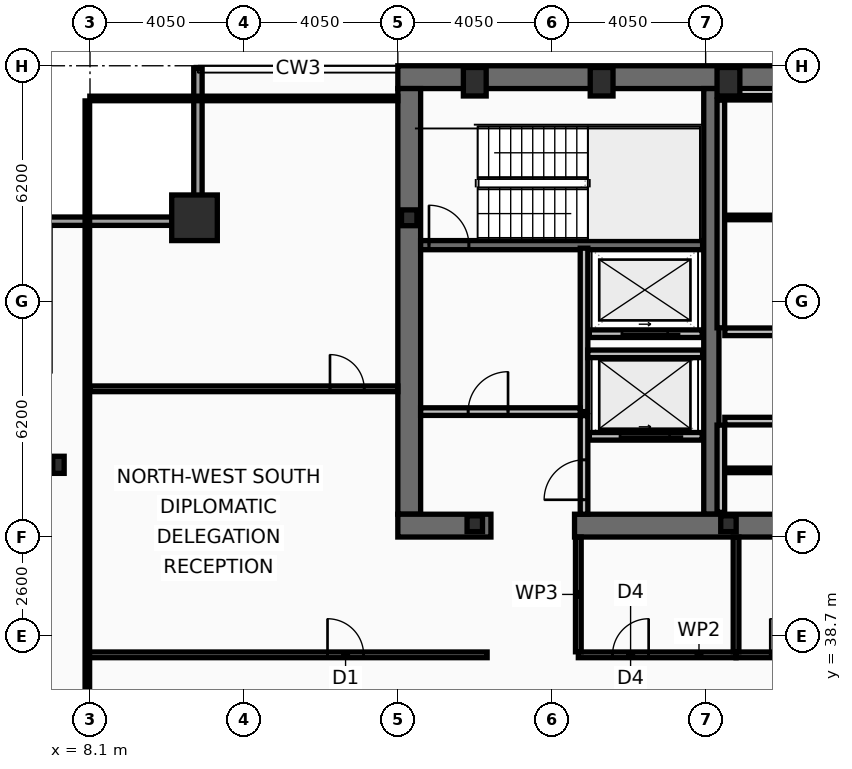
"""IFC4 building model, lengths in metres.
Left out: names, types, materials, properties, quantities, classifications, styles, units other than length and angle.
Written with IfcOpenShell. Run it as: python <this file> out.ifc"""

import sys

from ifc_helpers import new_model, si_unit, direction, frame, frame_2d, origin, origin_2d, place, context, subcontext, project, spatial, rectangle, hollow_rectangle, i_section, extrude, element, fill, save


model = new_model("IFC4")
c1 = context("Model", 3, precision=1e-05, world=origin(), true_north=direction((0.0, 1.0)))
c2 = subcontext(c1, "Body", "Model", "MODEL_VIEW")
j1 = project(units=[si_unit("LENGTHUNIT", "METRE"), si_unit("PLANEANGLEUNIT", "RADIAN")], contexts=[c1])
p1 = place(None, origin())
s1 = spatial("IfcSite", under=j1, at=p1, CompositionType="ELEMENT")
p2 = place(p1, origin())
s2 = spatial("IfcBuilding", under=s1, at=p2, CompositionType="ELEMENT")
p3 = place(p2, frame((0.0, 0.0, 210.2)))
s3 = spatial("IfcBuildingStorey", under=s2, at=p3, CompositionType="ELEMENT", Elevation=210.2)
p4 = place(p3, frame((16.2, 53.4, 0.0), z_axis=(0.0, 0.0, 1.0), x_axis=(1.0, 0.0, 0.0)))
e1 = element("IfcWall", 1, at=p4, inside=s3, PredefinedType="SHEAR", context=c2, shape_type="SweptSolid", body=[
    extrude(rectangle(XDim=40.5, YDim=0.6, at=frame_2d((20.25, 0.0))), origin(), (0.0, 0.0, 1.0), 3.44),
])
p5 = place(p3, frame((16.5, 41.9, 0.0), z_axis=(0.0, 0.0, 1.0), x_axis=(0.0, 1.0, 0.0)))
e2 = element("IfcWall", 2, at=p5, inside=s3, PredefinedType="SHEAR", context=c2, shape_type="SweptSolid", body=[
    extrude(rectangle(XDim=11.2, YDim=0.6, at=frame_2d((5.6, 0.0))), origin(), (0.0, 0.0, 1.0), 3.44),
])
p6 = place(p3, frame((24.45, 41.9, 0.0), z_axis=(0.0, 0.0, 1.0), x_axis=(0.0, 1.0, 0.0)))
e3 = element("IfcWall", 3, at=p6, inside=s3, PredefinedType="SHEAR", context=c2, shape_type="SweptSolid", body=[
    extrude(rectangle(XDim=11.2, YDim=0.4, at=frame_2d((5.6, 0.0))), origin(), (0.0, 0.0, 1.0), 3.44),
])
p7 = place(p3, frame((18.65, 41.6, 0.0), z_axis=(0.0, 0.0, 1.0), x_axis=(-1.0, 0.0, 0.0)))
e4 = element("IfcWall", 4, at=p7, inside=s3, PredefinedType="SHEAR", context=c2, shape_type="SweptSolid", body=[
    extrude(rectangle(XDim=2.45, YDim=0.6, at=frame_2d((1.225, 0.0))), origin(), (0.0, 0.0, 1.0), 3.44),
])
p8 = place(p3, frame((32.3, 41.6, 0.0), z_axis=(0.0, 0.0, 1.0), x_axis=(-1.0, 0.0, 0.0)))
e5 = element("IfcWall", 5, at=p8, inside=s3, PredefinedType="SHEAR", context=c2, shape_type="SweptSolid", body=[
    extrude(rectangle(XDim=11.45, YDim=0.6, at=frame_2d((5.725, 0.0))), origin(), (0.0, 0.0, 1.0), 3.44),
])
p9 = place(p3, frame((16.8, 48.98, 0.0), z_axis=(0.0, 0.0, 1.0), x_axis=(1.0, 0.0, 0.0)))
e6 = element("IfcWall", 6, at=p9, inside=s3, PredefinedType="SHEAR", context=c2, shape_type="SweptSolid", body=[
    extrude(rectangle(XDim=7.42, YDim=0.24, at=frame_2d((3.71, 0.0))), origin(), (0.0, 0.0, 1.0), 3.44),
])
p10 = place(p9, frame((0.22, 0.0, 0.0)))
e7 = element("IfcOpeningElement", 7, at=p10, cuts=e6, PredefinedType="OPENING", context=c2, shape_type="SweptSolid", body=[
    extrude(rectangle(XDim=1.05, YDim=2.15, at=frame_2d((0.525, 1.075))), frame((0.0, 0.13, 0.0), z_axis=(0.0, -1.0, 0.0), x_axis=(1.0, 0.0, 0.0)), (0.0, 0.0, 1.0), 0.26),
])
p11 = place(p3, frame((10.85, 49.7, 0.0), z_axis=(0.0, 0.0, 1.0), x_axis=(1.0, 0.0, 0.0)))
e8 = element("IfcColumn", 8, at=p11, inside=s3, PredefinedType="COLUMN", context=c2, shape_type="SweptSolid", body=[
    extrude(hollow_rectangle(XDim=1.2, YDim=1.2, WallThickness=0.06, at=origin_2d()), origin(), (0.0, 0.0, 1.0), 3.6),
])
for number, where, z_axis, x_axis in (
    (9, (18.225, 53.28, 0.0), (0.0, 0.0, 1.0), (1.0, 0.0, 0.0)),
    (10, (21.562, 53.28, 0.0), (0.0, 0.0, 1.0), (1.0, 0.0, 0.0)),
    (11, (24.9, 53.28, 0.0), (0.0, 0.0, 1.0), (1.0, 0.0, 0.0)),
):
    element("IfcColumn", number, at=place(p3, frame(where, z_axis=z_axis, x_axis=x_axis)), inside=s3, PredefinedType="COLUMN", context=c2, shape_type="SweptSolid", body=[
        extrude(hollow_rectangle(XDim=0.6, YDim=0.75, WallThickness=0.045, at=origin_2d()), origin(), (0.0, 0.0, 1.0), 3.6),
    ])
p12 = place(p3, frame((7.27, 43.2, 0.0), z_axis=(0.0, 0.0, 1.0), x_axis=(1.0, 0.0, 0.0)))
e12 = element("IfcColumn", 12, at=p12, inside=s3, PredefinedType="COLUMN", context=c2, shape_type="SweptSolid", body=[
    extrude(i_section(OverallWidth=0.3, OverallDepth=0.45, WebThickness=0.014, FlangeThickness=0.026, at=origin_2d()), origin(), (0.0, 0.0, 1.0), 3.6),
])
for number, where, z_axis, x_axis in (
    (13, (16.5, 49.7, 0.0), (0.0, 0.0, 1.0), (1.0, 0.0, 0.0)),
    (14, (18.225, 41.65, 0.0), (0.0, 0.0, 1.0), (1.0, 0.0, 0.0)),
    (15, (24.9, 41.65, 0.0), (0.0, 0.0, 1.0), (1.0, 0.0, 0.0)),
):
    element("IfcColumn", number, at=place(p3, frame(where, z_axis=z_axis, x_axis=x_axis)), inside=s3, PredefinedType="COLUMN", context=c2, shape_type="SweptSolid", body=[
        extrude(i_section(OverallWidth=0.406, OverallDepth=0.416, WebThickness=0.03, FlangeThickness=0.048, at=origin_2d()), origin(), (0.0, 0.0, 1.0), 3.6),
    ])
p13 = place(p3, frame((6.83, 49.61, 0.0), z_axis=(0.0, 0.0, 1.0), x_axis=(1.0, 0.0, 0.0)))
e16 = element("IfcWall", 16, at=p13, inside=s3, PredefinedType="SOLIDWALL", context=c2, shape_type="SweptSolid", body=[
    extrude(rectangle(XDim=4.22, YDim=0.22, at=frame_2d((2.11, 0.0))), origin(), (0.0, 0.0, 1.0), 2.83),
])
p14 = place(p3, frame((10.94, 49.72, 0.0), z_axis=(0.0, 0.0, 1.0), x_axis=(0.0, 1.0, 0.0)))
e17 = element("IfcWall", 17, at=p14, inside=s3, PredefinedType="SOLIDWALL", context=c2, shape_type="SweptSolid", body=[
    extrude(rectangle(XDim=3.91, YDim=0.22, at=frame_2d((1.955, 0.0))), origin(), (0.0, 0.0, 1.0), 2.83),
])
p15 = place(p3, frame((24.21, 43.95, 0.0), z_axis=(0.0, 0.0, 1.0), x_axis=(-1.0, 0.0, 0.0)))
e18 = element("IfcWall", 18, at=p15, inside=s3, PredefinedType="PARTITIONING", context=c2, shape_type="SweptSolid", body=[
    extrude(rectangle(XDim=2.97, YDim=0.2, at=frame_2d((1.485, 0.0))), origin(), (0.0, 0.0, 1.0), 3.44),
])
p16 = place(p15, frame((0.86, 0.0, 0.0)))
e19 = element("IfcOpeningElement", 19, at=p16, cuts=e18, PredefinedType="OPENING", context=c2, shape_type="SweptSolid", body=[
    extrude(rectangle(XDim=1.3, YDim=2.18, at=frame_2d((0.65, 1.09))), frame((0.0, 0.11, 0.0), z_axis=(0.0, -1.0, 0.0), x_axis=(1.0, 0.0, 0.0)), (0.0, 0.0, 1.0), 0.22),
])
p17 = place(p3, frame((24.21, 46.65, 0.0), z_axis=(0.0, 0.0, 1.0), x_axis=(-1.0, 0.0, 0.0)))
e20 = element("IfcWall", 20, at=p17, inside=s3, PredefinedType="PARTITIONING", context=c2, shape_type="SweptSolid", body=[
    extrude(rectangle(XDim=2.97, YDim=0.2, at=frame_2d((1.485, 0.0))), origin(), (0.0, 0.0, 1.0), 3.44),
])
p18 = place(p17, frame((0.91, 0.0, 0.0)))
e21 = element("IfcOpeningElement", 21, at=p18, cuts=e20, PredefinedType="OPENING", context=c2, shape_type="SweptSolid", body=[
    extrude(rectangle(XDim=1.2, YDim=2.18, at=frame_2d((0.6, 1.09))), frame((0.0, 0.11, 0.0), z_axis=(0.0, -1.0, 0.0), x_axis=(1.0, 0.0, 0.0)), (0.0, 0.0, 1.0), 0.22),
])
p19 = place(p3, frame((21.1, 44.6, 0.0), z_axis=(0.0, 0.0, 1.0), x_axis=(0.0, 1.0, 0.0)))
e22 = element("IfcWall", 22, at=p19, inside=s3, PredefinedType="PARTITIONING", context=c2, shape_type="SweptSolid", body=[
    extrude(rectangle(XDim=4.3, YDim=0.2, at=frame_2d((2.15, 0.0))), origin(), (0.0, 0.0, 1.0), 3.44),
])
p20 = place(p3, frame((16.8, 44.6, 0.0), z_axis=(0.0, 0.0, 1.0), x_axis=(1.0, 0.0, 0.0)))
e23 = element("IfcWall", 23, at=p20, inside=s3, PredefinedType="PARTITIONING", context=c2, shape_type="SweptSolid", body=[
    extrude(rectangle(XDim=4.2, YDim=0.2, at=frame_2d((2.1, 0.0))), origin(), (0.0, 0.0, 1.0), 3.44),
])
p21 = place(p20, frame((1.25, 0.0, 0.0)))
e24 = element("IfcOpeningElement", 24, at=p21, cuts=e23, PredefinedType="OPENING", context=c2, shape_type="SweptSolid", body=[
    extrude(rectangle(XDim=1.05, YDim=2.15, at=frame_2d((0.525, 1.075))), frame((0.0, 0.11, 0.0), z_axis=(0.0, -1.0, 0.0), x_axis=(1.0, 0.0, 0.0)), (0.0, 0.0, 1.0), 0.22),
])
p22 = place(p3, frame((21.2, 46.12, 0.0), z_axis=(0.0, 0.0, 1.0), x_axis=(1.0, 0.0, 0.0)))
e25 = element("IfcWall", 25, at=p22, inside=s3, PredefinedType="PARTITIONING", context=c2, shape_type="SweptSolid", body=[
    extrude(rectangle(XDim=3.02, YDim=0.2, at=frame_2d((1.51, 0.0))), origin(), (0.0, 0.0, 1.0), 3.44),
])
p23 = place(p3, frame((21.1, 41.9, 0.0), z_axis=(0.0, 0.0, 1.0), x_axis=(0.0, 1.0, 0.0)))
e26 = element("IfcWall", 26, at=p23, inside=s3, PredefinedType="PARTITIONING", context=c2, shape_type="SweptSolid", body=[
    extrude(rectangle(XDim=2.595, YDim=0.2, at=frame_2d((1.298, 0.0))), origin(), (0.0, 0.0, 1.0), 3.44),
])
p24 = place(p23, frame((0.38, 0.0, 0.0)))
e27 = element("IfcOpeningElement", 27, at=p24, cuts=e26, PredefinedType="OPENING", context=c2, shape_type="SweptSolid", body=[
    extrude(rectangle(XDim=1.05, YDim=2.15, at=frame_2d((0.525, 1.075))), frame((0.0, 0.11, 0.0), z_axis=(0.0, -1.0, 0.0), x_axis=(1.0, 0.0, 0.0)), (0.0, 0.0, 1.0), 0.22),
])
p25 = place(p3, frame((24.7, 46.805, 0.0), z_axis=(0.0, 0.0, 1.0), x_axis=(0.0, 1.0, 0.0)))
e28 = element("IfcWall", 28, at=p25, inside=s3, PredefinedType="PARTITIONING", context=c2, shape_type="SweptSolid", body=[
    extrude(rectangle(XDim=5.99, YDim=0.2, at=frame_2d((2.995, 0.0))), origin(), (0.0, 0.0, 1.0), 3.44),
])
p26 = place(p3, frame((24.805, 52.86, 0.0), z_axis=(0.0, 0.0, 1.0), x_axis=(1.0, 0.0, 0.0)))
e29 = element("IfcWall", 29, at=p26, inside=s3, PredefinedType="PARTITIONING", context=c2, shape_type="SweptSolid", body=[
    extrude(rectangle(XDim=7.51, YDim=0.12, at=frame_2d((3.755, 0.0))), origin(), (0.0, 0.0, 1.0), 3.44),
])
p27 = place(p3, frame((24.805, 49.709, 0.0), z_axis=(0.0, 0.0, 1.0), x_axis=(1.0, 0.0, 0.0)))
e30 = element("IfcWall", 30, at=p27, inside=s3, PredefinedType="PARTITIONING", context=c2, shape_type="SweptSolid", body=[
    extrude(rectangle(XDim=7.51, YDim=0.12, at=frame_2d((3.755, 0.0))), origin(), (0.0, 0.0, 1.0), 3.44),
])
p28 = place(p27, frame((2.4, 0.0, 0.0)))
e31 = element("IfcOpeningElement", 31, at=p28, cuts=e30, PredefinedType="OPENING", context=c2, shape_type="SweptSolid", body=[
    extrude(rectangle(XDim=0.9, YDim=2.05, at=frame_2d((0.45, 1.025))), frame((0.0, 0.07, 0.0), z_axis=(0.0, -1.0, 0.0), x_axis=(1.0, 0.0, 0.0)), (0.0, 0.0, 1.0), 0.14),
])
p29 = place(p3, frame((24.805, 46.7, 0.0), z_axis=(0.0, 0.0, 1.0), x_axis=(1.0, 0.0, 0.0)))
e32 = element("IfcWall", 32, at=p29, inside=s3, PredefinedType="PARTITIONING", context=c2, shape_type="SweptSolid", body=[
    extrude(rectangle(XDim=7.51, YDim=0.2, at=frame_2d((3.755, 0.0))), origin(), (0.0, 0.0, 1.0), 3.44),
])
p30 = place(p29, frame((2.4, 0.0, 0.0)))
e33 = element("IfcOpeningElement", 33, at=p30, cuts=e32, PredefinedType="OPENING", context=c2, shape_type="SweptSolid", body=[
    extrude(rectangle(XDim=0.95, YDim=2.1, at=frame_2d((0.475, 1.05))), frame((0.0, 0.11, 0.0), z_axis=(0.0, -1.0, 0.0), x_axis=(1.0, 0.0, 0.0)), (0.0, 0.0, 1.0), 0.22),
])
p31 = place(p3, frame((24.7, 41.95, 0.0), z_axis=(0.0, 0.0, 1.0), x_axis=(0.0, 1.0, 0.0)))
e34 = element("IfcWall", 34, at=p31, inside=s3, PredefinedType="PARTITIONING", context=c2, shape_type="SweptSolid", body=[
    extrude(rectangle(XDim=2.295, YDim=0.2, at=frame_2d((1.147, 0.0))), origin(), (0.0, 0.0, 1.0), 3.44),
])
p32 = place(p3, frame((24.805, 43.054, 0.0), z_axis=(0.0, 0.0, 1.0), x_axis=(1.0, 0.0, 0.0)))
e35 = element("IfcWall", 35, at=p32, inside=s3, PredefinedType="PARTITIONING", context=c2, shape_type="SweptSolid", body=[
    extrude(rectangle(XDim=7.34, YDim=0.12, at=frame_2d((3.67, 0.0))), origin(), (0.0, 0.0, 1.0), 3.44),
])
p33 = place(p32, frame((2.4, 0.0, 0.0)))
e36 = element("IfcOpeningElement", 36, at=p33, cuts=e35, PredefinedType="OPENING", context=c2, shape_type="SweptSolid", body=[
    extrude(rectangle(XDim=0.9, YDim=2.05, at=frame_2d((0.45, 1.025))), frame((0.0, 0.07, 0.0), z_axis=(0.0, -1.0, 0.0), x_axis=(1.0, 0.0, 0.0)), (0.0, 0.0, 1.0), 0.14),
])
p34 = place(p3, frame((24.805, 44.35, 0.0), z_axis=(0.0, 0.0, 1.0), x_axis=(1.0, 0.0, 0.0)))
e37 = element("IfcWall", 37, at=p34, inside=s3, PredefinedType="PARTITIONING", context=c2, shape_type="SweptSolid", body=[
    extrude(rectangle(XDim=7.34, YDim=0.2, at=frame_2d((3.67, 0.0))), origin(), (0.0, 0.0, 1.0), 3.44),
])
p35 = place(p34, frame((2.4, 0.0, 0.0)))
e38 = element("IfcOpeningElement", 38, at=p35, cuts=e37, PredefinedType="OPENING", context=c2, shape_type="SweptSolid", body=[
    extrude(rectangle(XDim=0.95, YDim=2.1, at=frame_2d((0.475, 1.05))), frame((0.0, 0.11, 0.0), z_axis=(0.0, -1.0, 0.0), x_axis=(1.0, 0.0, 0.0)), (0.0, 0.0, 1.0), 0.22),
])
p36 = place(p3, frame((20.95, 38.2, 0.0), z_axis=(0.0, 0.0, 1.0), x_axis=(1.0, 0.0, 0.0)))
e39 = element("IfcWall", 39, at=p36, inside=s3, PredefinedType="PARTITIONING", context=c2, shape_type="SweptSolid", body=[
    extrude(rectangle(XDim=4.15, YDim=0.15, at=frame_2d((2.075, 0.0))), origin(), (0.0, 0.0, 1.0), 2.73),
])
p37 = place(p36, frame((0.9, 0.0, 0.0)))
e40 = element("IfcOpeningElement", 40, at=p37, cuts=e39, PredefinedType="OPENING", context=c2, shape_type="SweptSolid", body=[
    extrude(rectangle(XDim=0.95, YDim=2.05, at=frame_2d((0.475, 1.025))), frame((0.0, 0.085, 0.0), z_axis=(0.0, -1.0, 0.0), x_axis=(1.0, 0.0, 0.0)), (0.0, 0.0, 1.0), 0.17),
])
p38 = place(p3, frame((25.1, 38.2, 0.0), z_axis=(0.0, 0.0, 1.0), x_axis=(1.0, 0.0, 0.0)))
e41 = element("IfcWall", 41, at=p38, inside=s3, PredefinedType="PARTITIONING", context=c2, shape_type="SweptSolid", body=[
    extrude(rectangle(XDim=4.1, YDim=0.15, at=frame_2d((2.05, 0.0))), origin(), (0.0, 0.0, 1.0), 2.73),
])
p39 = place(p38, frame((0.9, 0.0, 0.0)))
e42 = element("IfcOpeningElement", 42, at=p39, cuts=e41, PredefinedType="OPENING", context=c2, shape_type="SweptSolid", body=[
    extrude(rectangle(XDim=0.95, YDim=2.05, at=frame_2d((0.475, 1.025))), frame((0.0, 0.085, 0.0), z_axis=(0.0, -1.0, 0.0), x_axis=(1.0, 0.0, 0.0)), (0.0, 0.0, 1.0), 0.17),
])
p40 = place(p3, frame((20.95, 38.28, 0.0), z_axis=(0.0, 0.0, 1.0), x_axis=(0.0, 1.0, 0.0)))
e43 = element("IfcWall", 43, at=p40, inside=s3, PredefinedType="PARTITIONING", context=c2, shape_type="SweptSolid", body=[
    extrude(rectangle(XDim=3.02, YDim=0.15, at=frame_2d((1.51, 0.0))), origin(), (0.0, 0.0, 1.0), 3.44),
])
p41 = place(p3, frame((25.1, 38.28, 0.0), z_axis=(0.0, 0.0, 1.0), x_axis=(0.0, 1.0, 0.0)))
e44 = element("IfcWall", 44, at=p41, inside=s3, PredefinedType="PARTITIONING", context=c2, shape_type="SweptSolid", body=[
    extrude(rectangle(XDim=3.02, YDim=0.15, at=frame_2d((1.51, 0.0))), origin(), (0.0, 0.0, 1.0), 2.73),
])
p42 = place(p3, frame((8.03, 38.2, 0.0), z_axis=(0.0, 0.0, 1.0), x_axis=(1.0, 0.0, 0.0)))
e45 = element("IfcWall", 45, at=p42, inside=s3, PredefinedType="PARTITIONING", context=c2, shape_type="SweptSolid", body=[
    extrude(rectangle(XDim=10.52, YDim=0.15, at=frame_2d((5.26, 0.0))), origin(), (0.0, 0.0, 1.0), 2.73),
])
p43 = place(p42, frame((6.32, 0.0, 0.0)))
e46 = element("IfcOpeningElement", 46, at=p43, cuts=e45, PredefinedType="OPENING", context=c2, shape_type="SweptSolid", body=[
    extrude(rectangle(XDim=0.95, YDim=2.05, at=frame_2d((0.475, 1.025))), frame((0.0, 0.085, 0.0), z_axis=(0.0, -1.0, 0.0), x_axis=(1.0, 0.0, 0.0)), (0.0, 0.0, 1.0), 0.17),
])
p44 = place(p3, frame((8.095, 45.2, 0.0), z_axis=(0.0, 0.0, 1.0), x_axis=(1.0, 0.0, 0.0)))
e47 = element("IfcWall", 47, at=p44, inside=s3, PredefinedType="PARTITIONING", context=c2, shape_type="SweptSolid", body=[
    extrude(rectangle(XDim=8.105, YDim=0.15, at=frame_2d((4.052, 0.0))), origin(), (0.0, 0.0, 1.0), 2.83),
])
p45 = place(p44, frame((6.32, 0.0, 0.0)))
e48 = element("IfcOpeningElement", 48, at=p45, cuts=e47, PredefinedType="OPENING", context=c2, shape_type="SweptSolid", body=[
    extrude(rectangle(XDim=0.9, YDim=2.05, at=frame_2d((0.45, 1.025))), frame((0.0, 0.085, 0.0), z_axis=(0.0, -1.0, 0.0), x_axis=(1.0, 0.0, 0.0)), (0.0, 0.0, 1.0), 0.17),
])
p46 = place(p3, frame((8.03, 10.665, 0.0), z_axis=(0.0, 0.0, 1.0), x_axis=(0.0, 1.0, 0.0)))
e49 = element("IfcWall", 49, at=p46, inside=s3, PredefinedType="PARTITIONING", context=c2, shape_type="SweptSolid", body=[
    extrude(rectangle(XDim=42.11, YDim=0.12, at=frame_2d((21.055, 0.0))), origin(), (0.0, 0.0, 1.0), 2.73),
])
p47 = place(p3, frame((8.095, 52.84, 0.0), z_axis=(0.0, 0.0, 1.0), x_axis=(1.0, 0.0, 0.0)))
e50 = element("IfcWall", 50, at=p47, inside=s3, PredefinedType="PARTITIONING", context=c2, shape_type="SweptSolid", body=[
    extrude(rectangle(XDim=8.105, YDim=0.12, at=frame_2d((4.052, 0.0))), origin(), (0.0, 0.0, 1.0), 3.44),
])
p48 = place(p10, origin())
e51 = element("IfcDoor", 51, at=p48, inside=s3, OperationType="SINGLE_SWING_LEFT", PredefinedType="DOOR", context=c2, shape_type="SweptSolid", body=[
    extrude(rectangle(XDim=1.05, YDim=2.15, at=frame_2d((0.525, 1.075))), frame((0.0, 0.025, 0.0), z_axis=(0.0, -1.0, 0.0), x_axis=(1.0, 0.0, 0.0)), (0.0, 0.0, 1.0), 0.05),
])
fill(e7, e51)
p49 = place(p16, origin())
e52 = element("IfcDoor", 52, at=p49, inside=s3, OperationType="SLIDING_TO_LEFT", PredefinedType="DOOR", context=c2, shape_type="SweptSolid", body=[
    extrude(rectangle(XDim=1.3, YDim=2.18, at=frame_2d((0.65, 1.09))), frame((0.0, 0.025, 0.0), z_axis=(0.0, -1.0, 0.0), x_axis=(1.0, 0.0, 0.0)), (0.0, 0.0, 1.0), 0.05),
])
fill(e19, e52)
p50 = place(p18, origin())
e53 = element("IfcDoor", 53, at=p50, inside=s3, OperationType="SLIDING_TO_LEFT", PredefinedType="DOOR", context=c2, shape_type="SweptSolid", body=[
    extrude(rectangle(XDim=1.2, YDim=2.18, at=frame_2d((0.6, 1.09))), frame((0.0, 0.025, 0.0), z_axis=(0.0, -1.0, 0.0), x_axis=(1.0, 0.0, 0.0)), (0.0, 0.0, 1.0), 0.05),
])
fill(e21, e53)
p51 = place(p21, origin())
e54 = element("IfcDoor", 54, at=p51, inside=s3, OperationType="SINGLE_SWING_RIGHT", PredefinedType="DOOR", context=c2, shape_type="SweptSolid", body=[
    extrude(rectangle(XDim=1.05, YDim=2.15, at=frame_2d((0.525, 1.075))), frame((0.0, 0.025, 0.0), z_axis=(0.0, -1.0, 0.0), x_axis=(1.0, 0.0, 0.0)), (0.0, 0.0, 1.0), 0.05),
])
fill(e24, e54)
p52 = place(p24, origin())
e55 = element("IfcDoor", 55, at=p52, inside=s3, OperationType="SINGLE_SWING_LEFT", PredefinedType="DOOR", context=c2, shape_type="SweptSolid", body=[
    extrude(rectangle(XDim=1.05, YDim=2.15, at=frame_2d((0.525, 1.075))), frame((0.0, 0.025, 0.0), z_axis=(0.0, -1.0, 0.0), x_axis=(1.0, 0.0, 0.0)), (0.0, 0.0, 1.0), 0.05),
])
fill(e27, e55)
p53 = place(p37, origin())
e56 = element("IfcDoor", 56, at=p53, inside=s3, OperationType="SINGLE_SWING_RIGHT", PredefinedType="DOOR", context=c2, shape_type="SweptSolid", body=[
    extrude(rectangle(XDim=0.95, YDim=2.05, at=frame_2d((0.475, 1.025))), frame((0.0, 0.025, 0.0), z_axis=(0.0, -1.0, 0.0), x_axis=(1.0, 0.0, 0.0)), (0.0, 0.0, 1.0), 0.05),
])
fill(e40, e56)
p54 = place(p39, origin())
e57 = element("IfcDoor", 57, at=p54, inside=s3, OperationType="SINGLE_SWING_LEFT", PredefinedType="DOOR", context=c2, shape_type="SweptSolid", body=[
    extrude(rectangle(XDim=0.95, YDim=2.05, at=frame_2d((0.475, 1.025))), frame((0.0, 0.025, 0.0), z_axis=(0.0, -1.0, 0.0), x_axis=(1.0, 0.0, 0.0)), (0.0, 0.0, 1.0), 0.05),
])
fill(e42, e57)
p55 = place(p43, origin())
e58 = element("IfcDoor", 58, at=p55, inside=s3, OperationType="SINGLE_SWING_LEFT", PredefinedType="DOOR", context=c2, shape_type="SweptSolid", body=[
    extrude(rectangle(XDim=0.95, YDim=2.05, at=frame_2d((0.475, 1.025))), frame((0.0, 0.025, 0.0), z_axis=(0.0, -1.0, 0.0), x_axis=(1.0, 0.0, 0.0)), (0.0, 0.0, 1.0), 0.05),
])
fill(e46, e58)
p56 = place(p45, origin())
e59 = element("IfcDoor", 59, at=p56, inside=s3, OperationType="SINGLE_SWING_LEFT", PredefinedType="DOOR", context=c2, shape_type="SweptSolid", body=[
    extrude(rectangle(XDim=0.9, YDim=2.05, at=frame_2d((0.45, 1.025))), frame((0.0, 0.025, 0.0), z_axis=(0.0, -1.0, 0.0), x_axis=(1.0, 0.0, 0.0)), (0.0, 0.0, 1.0), 0.05),
])
fill(e48, e59)
save(model, sys.argv[1])
